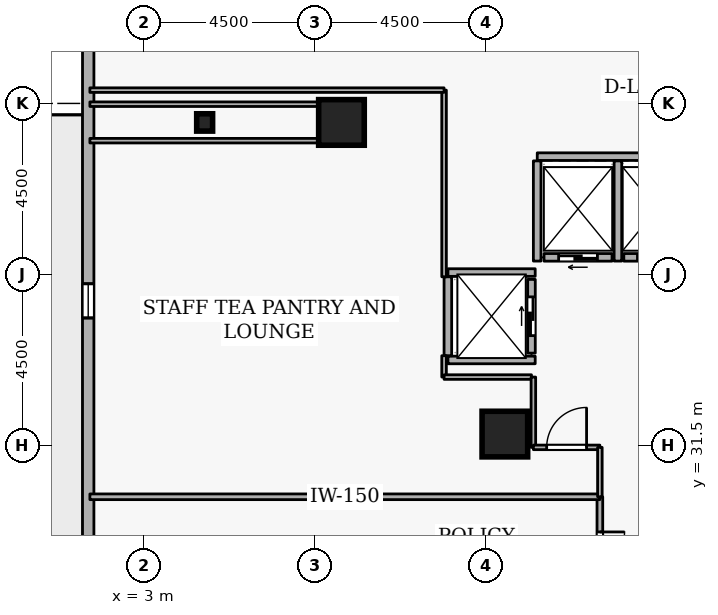
"""IFC4 building model, lengths in metres.
Left out: names, types, materials, properties, quantities, classifications, styles, units other than length and angle.
Written with IfcOpenShell. Run it as: python <this file> out.ifc"""

import sys

from ifc_helpers import new_model, si_unit, direction, frame, frame_2d, origin, origin_2d, place, context, subcontext, project, spatial, rectangle, i_section, extrude, element, fill, save


model = new_model("IFC4")
c1 = context("Model", 3, precision=1e-05, world=origin(), true_north=direction((0.0, 1.0)))
c2 = subcontext(c1, "Body", "Model", "MODEL_VIEW")
j1 = project(units=[si_unit("LENGTHUNIT", "METRE"), si_unit("PLANEANGLEUNIT", "RADIAN")], contexts=[c1])
p1 = place(None, origin())
s1 = spatial("IfcSite", under=j1, at=p1, CompositionType="ELEMENT")
p2 = place(p1, origin())
s2 = spatial("IfcBuilding", under=s1, at=p2, CompositionType="ELEMENT")
p3 = place(p2, frame((0.0, 0.0, 112.5)))
s3 = spatial("IfcBuildingStorey", under=s2, at=p3, CompositionType="ELEMENT", Elevation=112.5)
for number, where, z_axis, x_axis in (
    (1, (8.2, 40.0, 0.0), (0.0, 0.0, 1.0), (1.0, 0.0, 0.0)),
    (2, (12.5, 31.8, 0.0), (0.0, 0.0, 1.0), (1.0, 0.0, 0.0)),
):
    element("IfcColumn", number, at=place(p3, frame(where, z_axis=z_axis, x_axis=x_axis)), inside=s3, PredefinedType="COLUMN", context=c2, shape_type="SweptSolid", body=[
        extrude(rectangle(XDim=1.2, YDim=1.2, at=origin_2d()), origin(), (0.0, 0.0, 1.0), 3.6),
    ])
p4 = place(p3, frame((4.6, 40.0, 0.0), z_axis=(0.0, 0.0, 1.0), x_axis=(1.0, 0.0, 0.0)))
e3 = element("IfcColumn", 3, at=p4, inside=s3, PredefinedType="COLUMN", context=c2, shape_type="SweptSolid", body=[
    extrude(i_section(OverallWidth=0.418, OverallDepth=0.456, WebThickness=0.042, FlangeThickness=0.067, FilletRadius=0.015, at=origin_2d()), origin(), (0.0, 0.0, 1.0), 3.6),
])
p5 = place(p3, frame((1.536, 48.055, 0.0), z_axis=(0.0, 0.0, 1.0), x_axis=(-2.6801568e-05, -0.999999999641, 0.0)))
e4 = element("IfcWall", 4, at=p5, inside=s3, PredefinedType="STANDARD", context=c2, shape_type="SweptSolid", body=[
    extrude(rectangle(XDim=36.437, YDim=0.3, at=frame_2d((18.218, 0.0))), origin(), (0.0, 0.0, 1.0), 2.7),
])
p6 = place(p5, frame((19.118, 0.0, 0.0)))
e5 = element("IfcOpeningElement", 5, at=p6, cuts=e4, PredefinedType="OPENING", context=c2, shape_type="SweptSolid", body=[
    extrude(rectangle(XDim=1.0, YDim=2.08, at=frame_2d((0.5, 1.04))), frame((0.0, 0.16, 0.0), z_axis=(0.0, -1.0, 0.0), x_axis=(1.0, 0.0, 0.0)), (0.0, 0.0, 1.0), 0.32),
])
p7 = place(p5, frame((2.7, 0.0, 0.72)))
e6 = element("IfcOpeningElement", 6, at=p7, cuts=e4, PredefinedType="OPENING", context=c2, shape_type="SweptSolid", body=[
    extrude(rectangle(XDim=0.9, YDim=1.75, at=frame_2d((0.45, 0.875))), frame((0.0, 0.16, 0.0), z_axis=(0.0, -1.0, 0.0), x_axis=(1.0, 0.0, 0.0)), (0.0, 0.0, 1.0), 0.32),
])
p8 = place(p5, frame((12.3, 0.0, 0.72)))
e7 = element("IfcOpeningElement", 7, at=p8, cuts=e4, PredefinedType="OPENING", context=c2, shape_type="SweptSolid", body=[
    extrude(rectangle(XDim=0.9, YDim=1.75, at=frame_2d((0.45, 0.875))), frame((0.0, 0.16, 0.0), z_axis=(0.0, -1.0, 0.0), x_axis=(1.0, 0.0, 0.0)), (0.0, 0.0, 1.0), 0.32),
])
p9 = place(p5, frame((21.9, 0.0, 0.72)))
e8 = element("IfcOpeningElement", 8, at=p9, cuts=e4, PredefinedType="OPENING", context=c2, shape_type="SweptSolid", body=[
    extrude(rectangle(XDim=0.9, YDim=1.75, at=frame_2d((0.45, 0.875))), frame((0.0, 0.16, 0.0), z_axis=(0.0, -1.0, 0.0), x_axis=(1.0, 0.0, 0.0)), (0.0, 0.0, 1.0), 0.32),
])
p10 = place(p5, frame((26.7, 0.0, 0.72)))
e9 = element("IfcOpeningElement", 9, at=p10, cuts=e4, PredefinedType="OPENING", context=c2, shape_type="SweptSolid", body=[
    extrude(rectangle(XDim=0.9, YDim=1.75, at=frame_2d((0.45, 0.875))), frame((0.0, 0.16, 0.0), z_axis=(0.0, -1.0, 0.0), x_axis=(1.0, 0.0, 0.0)), (0.0, 0.0, 1.0), 0.32),
])
p11 = place(p5, frame((31.5, 0.0, 0.72)))
e10 = element("IfcOpeningElement", 10, at=p11, cuts=e4, PredefinedType="OPENING", context=c2, shape_type="SweptSolid", body=[
    extrude(rectangle(XDim=0.9, YDim=1.75, at=frame_2d((0.45, 0.875))), frame((0.0, 0.16, 0.0), z_axis=(0.0, -1.0, 0.0), x_axis=(1.0, 0.0, 0.0)), (0.0, 0.0, 1.0), 0.32),
])
p12 = place(p3, frame((17.37, 36.45, 0.0), z_axis=(0.0, 0.0, 1.0), x_axis=(-1.0, 0.0, 0.0)))
e11 = element("IfcWall", 11, at=p12, inside=s3, PredefinedType="STANDARD", context=c2, shape_type="SweptSolid", body=[
    extrude(rectangle(XDim=1.74, YDim=0.2, at=frame_2d((0.87, 0.0))), origin(), (0.0, 0.0, 1.0), 3.34),
])
p13 = place(p12, frame((0.36, 0.0, 0.0)))
e12 = element("IfcOpeningElement", 12, at=p13, cuts=e11, PredefinedType="OPENING", context=c2, shape_type="SweptSolid", body=[
    extrude(rectangle(XDim=1.02, YDim=2.06, at=frame_2d((0.51, 1.03))), frame((0.0, 0.11, 0.0), z_axis=(0.0, -1.0, 0.0), x_axis=(1.0, 0.0, 0.0)), (0.0, 0.0, 1.0), 0.22),
])
p14 = place(p3, frame((15.32, 36.45, 0.0), z_axis=(0.0, 0.0, 1.0), x_axis=(-1.0, 0.0, 0.0)))
e13 = element("IfcWall", 13, at=p14, inside=s3, PredefinedType="STANDARD", context=c2, shape_type="SweptSolid", body=[
    extrude(rectangle(XDim=1.79, YDim=0.2, at=frame_2d((0.895, 0.0))), origin(), (0.0, 0.0, 1.0), 3.34),
])
p15 = place(p14, frame((0.385, 0.0, 0.0)))
e14 = element("IfcOpeningElement", 14, at=p15, cuts=e13, PredefinedType="OPENING", context=c2, shape_type="SweptSolid", body=[
    extrude(rectangle(XDim=1.02, YDim=2.06, at=frame_2d((0.51, 1.03))), frame((0.0, 0.11, 0.0), z_axis=(0.0, -1.0, 0.0), x_axis=(1.0, 0.0, 0.0)), (0.0, 0.0, 1.0), 0.22),
])
p16 = place(p3, frame((13.2, 33.93, 0.0), z_axis=(0.0, 0.0, 1.0), x_axis=(0.0, 1.0, 0.0)))
e15 = element("IfcWall", 15, at=p16, inside=s3, PredefinedType="STANDARD", context=c2, shape_type="SweptSolid", body=[
    extrude(rectangle(XDim=1.94, YDim=0.2, at=frame_2d((0.97, 0.0))), origin(), (0.0, 0.0, 1.0), 3.34),
])
p17 = place(p16, frame((0.46, 0.0, 0.0)))
e16 = element("IfcOpeningElement", 16, at=p17, cuts=e15, PredefinedType="OPENING", context=c2, shape_type="SweptSolid", body=[
    extrude(rectangle(XDim=1.02, YDim=2.06, at=frame_2d((0.51, 1.03))), frame((0.0, 0.11, 0.0), z_axis=(0.0, -1.0, 0.0), x_axis=(1.0, 0.0, 0.0)), (0.0, 0.0, 1.0), 0.22),
])
p18 = place(p3, frame((13.352, 39.1, 0.0), z_axis=(0.0, 0.0, 1.0), x_axis=(1.0, 0.0, 0.0)))
e17 = element("IfcWall", 17, at=p18, inside=s3, PredefinedType="STANDARD", context=c2, shape_type="SweptSolid", body=[
    extrude(rectangle(XDim=4.196, YDim=0.2, at=frame_2d((2.098, 0.0))), origin(), (0.0, 0.0, 1.0), 3.34),
])
for number, where, z_axis, x_axis in (
    (18, (15.475, 36.352, 0.0), (0.0, 0.0, 1.0), (0.0, 1.0, 0.0)),
    (19, (13.35, 36.352, 0.0), (0.0, 0.0, 1.0), (0.0, 1.0, 0.0)),
):
    element("IfcWall", number, at=place(p3, frame(where, z_axis=z_axis, x_axis=x_axis)), inside=s3, PredefinedType="STANDARD", context=c2, shape_type="SweptSolid", body=[
        extrude(rectangle(XDim=2.636, YDim=0.2, at=frame_2d((1.318, 0.0))), origin(), (0.0, 0.0, 1.0), 3.34),
    ])
for number, where, z_axis, x_axis in (
    (20, (11.002, 36.05, 0.0), (0.0, 0.0, 1.0), (1.0, 0.0, 0.0)),
    (21, (11.002, 33.75, 0.0), (0.0, 0.0, 1.0), (1.0, 0.0, 0.0)),
):
    element("IfcWall", number, at=place(p3, frame(where, z_axis=z_axis, x_axis=x_axis)), inside=s3, PredefinedType="STANDARD", context=c2, shape_type="SweptSolid", body=[
        extrude(rectangle(XDim=2.296, YDim=0.2, at=frame_2d((1.148, 0.0))), origin(), (0.0, 0.0, 1.0), 3.34),
    ])
p19 = place(p3, frame((11.0, 33.862, 0.0), z_axis=(0.0, 0.0, 1.0), x_axis=(0.0, 1.0, 0.0)))
e22 = element("IfcWall", 22, at=p19, inside=s3, PredefinedType="STANDARD", context=c2, shape_type="SweptSolid", body=[
    extrude(rectangle(XDim=2.076, YDim=0.2, at=frame_2d((1.038, 0.0))), origin(), (0.0, 0.0, 1.0), 3.34),
])
p20 = place(p3, frame((15.0, 30.15, 0.0), z_axis=(0.0, 0.0, 1.0), x_axis=(0.0, -1.0, 0.0)))
e23 = element("IfcWall", 23, at=p20, inside=s3, PredefinedType="PARTITIONING", context=c2, shape_type="SweptSolid", body=[
    extrude(rectangle(XDim=3.15, YDim=0.15, at=frame_2d((1.575, 0.0))), origin(), (0.0, 0.0, 1.0), 3.34),
])
p21 = place(p20, frame((0.925, 0.0, 0.0)))
e24 = element("IfcOpeningElement", 24, at=p21, cuts=e23, PredefinedType="OPENING", context=c2, shape_type="SweptSolid", body=[
    extrude(rectangle(XDim=1.3, YDim=2.12, at=frame_2d((0.65, 1.06))), frame((0.0, 0.085, 0.0), z_axis=(0.0, -1.0, 0.0), x_axis=(1.0, 0.0, 0.0)), (0.0, 0.0, 1.0), 0.17),
])
p22 = place(p3, frame((1.58, 30.15, 0.0), z_axis=(0.0, 0.0, 1.0), x_axis=(1.0, 0.0, 0.0)))
e25 = element("IfcWall", 25, at=p22, inside=s3, PredefinedType="PARTITIONING", context=c2, shape_type="SweptSolid", body=[
    extrude(rectangle(XDim=13.42, YDim=0.15, at=frame_2d((6.71, 0.0))), origin(), (0.0, 0.0, 1.0), 3.34),
])
p23 = place(p3, frame((10.9, 40.85, 0.0), z_axis=(0.0, 0.0, 1.0), x_axis=(0.0, -1.0, 0.0)))
e26 = element("IfcWall", 26, at=p23, inside=s3, PredefinedType="PARTITIONING", context=c2, shape_type="SweptSolid", body=[
    extrude(rectangle(XDim=4.912, YDim=0.12, at=frame_2d((2.456, 0.0))), origin(), (0.0, 0.0, 1.0), 3.34),
])
p24 = place(p3, frame((10.9, 33.862, 0.0), z_axis=(0.0, 0.0, 1.0), x_axis=(0.0, -1.0, 0.0)))
e27 = element("IfcWall", 27, at=p24, inside=s3, PredefinedType="PARTITIONING", context=c2, shape_type="SweptSolid", body=[
    extrude(rectangle(XDim=0.562, YDim=0.12, at=frame_2d((0.281, 0.0))), origin(), (0.0, 0.0, 1.0), 3.34),
])
p25 = place(p3, frame((10.9, 33.3, 0.0), z_axis=(0.0, 0.0, 1.0), x_axis=(1.0, 0.0, 0.0)))
e28 = element("IfcWall", 28, at=p25, inside=s3, PredefinedType="PARTITIONING", context=c2, shape_type="SweptSolid", body=[
    extrude(rectangle(XDim=2.3, YDim=0.12, at=frame_2d((1.15, 0.0))), origin(), (0.0, 0.0, 1.0), 3.34),
])
p26 = place(p3, frame((13.25, 33.3, 0.0), z_axis=(0.0, 0.0, 1.0), x_axis=(0.0, -1.0, 0.0)))
e29 = element("IfcWall", 29, at=p26, inside=s3, PredefinedType="PARTITIONING", context=c2, shape_type="SweptSolid", body=[
    extrude(rectangle(XDim=1.85, YDim=0.12, at=frame_2d((0.925, 0.0))), origin(), (0.0, 0.0, 1.0), 3.34),
])
p27 = place(p3, frame((13.25, 31.45, 0.0), z_axis=(0.0, 0.0, 1.0), x_axis=(1.0, 0.0, 0.0)))
e30 = element("IfcWall", 30, at=p27, inside=s3, PredefinedType="PARTITIONING", context=c2, shape_type="SweptSolid", body=[
    extrude(rectangle(XDim=1.75, YDim=0.12, at=frame_2d((0.875, 0.0))), origin(), (0.0, 0.0, 1.0), 3.34),
])
p28 = place(p27, frame((0.35, 0.0, 0.0)))
e31 = element("IfcOpeningElement", 31, at=p28, cuts=e30, PredefinedType="OPENING", context=c2, shape_type="SweptSolid", body=[
    extrude(rectangle(XDim=1.05, YDim=2.1, at=frame_2d((0.525, 1.05))), frame((0.0, 0.07, 0.0), z_axis=(0.0, -1.0, 0.0), x_axis=(1.0, 0.0, 0.0)), (0.0, 0.0, 1.0), 0.14),
])
p29 = place(p3, frame((15.0, 31.45, 0.0), z_axis=(0.0, 0.0, 1.0), x_axis=(0.0, -1.0, 0.0)))
e32 = element("IfcWall", 32, at=p29, inside=s3, PredefinedType="PARTITIONING", context=c2, shape_type="SweptSolid", body=[
    extrude(rectangle(XDim=1.3, YDim=0.12, at=frame_2d((0.65, 0.0))), origin(), (0.0, 0.0, 1.0), 3.34),
])
for number, where, z_axis, x_axis in (
    (33, (1.58, 39.52, 0.0), (0.0, 0.0, 1.0), (1.0, 0.0, 0.0)),
    (34, (8.2, 40.48, 0.0), (0.0, 0.0, 1.0), (-1.0, 0.0, 0.0)),
):
    element("IfcWall", number, at=place(p3, frame(where, z_axis=z_axis, x_axis=x_axis)), inside=s3, PredefinedType="PARTITIONING", context=c2, shape_type="SweptSolid", body=[
        extrude(rectangle(XDim=6.62, YDim=0.12, at=frame_2d((3.31, 0.0))), origin(), (0.0, 0.0, 1.0), 3.34),
    ])
p30 = place(p3, frame((1.58, 40.85, 0.0), z_axis=(0.0, 0.0, 1.0), x_axis=(1.0, 0.0, 0.0)))
e35 = element("IfcWall", 35, at=p30, inside=s3, PredefinedType="PARTITIONING", context=c2, shape_type="SweptSolid", body=[
    extrude(rectangle(XDim=9.32, YDim=0.12, at=frame_2d((4.66, 0.0))), origin(), (0.0, 0.0, 1.0), 3.34),
])
p31 = place(p8, origin())
e36 = element("IfcWindow", 36, at=p31, inside=s3, PartitioningType="SINGLE_PANEL", PredefinedType="WINDOW", context=c2, shape_type="SweptSolid", body=[
    extrude(rectangle(XDim=0.9, YDim=1.75, at=frame_2d((0.45, 0.875))), frame((0.0, 0.03, 0.0), z_axis=(0.0, -1.0, 0.0), x_axis=(1.0, 0.0, 0.0)), (0.0, 0.0, 1.0), 0.06),
])
fill(e7, e36)
p32 = place(p13, origin())
e37 = element("IfcDoor", 37, at=p32, inside=s3, OperationType="SLIDING_TO_LEFT", PredefinedType="DOOR", context=c2, shape_type="SweptSolid", body=[
    extrude(rectangle(XDim=1.02, YDim=2.06, at=frame_2d((0.51, 1.03))), frame((0.0, 0.025, 0.0), z_axis=(0.0, -1.0, 0.0), x_axis=(1.0, 0.0, 0.0)), (0.0, 0.0, 1.0), 0.05),
])
fill(e12, e37)
p33 = place(p15, origin())
e38 = element("IfcDoor", 38, at=p33, inside=s3, OperationType="SLIDING_TO_LEFT", PredefinedType="DOOR", context=c2, shape_type="SweptSolid", body=[
    extrude(rectangle(XDim=1.02, YDim=2.06, at=frame_2d((0.51, 1.03))), frame((0.0, 0.025, 0.0), z_axis=(0.0, -1.0, 0.0), x_axis=(1.0, 0.0, 0.0)), (0.0, 0.0, 1.0), 0.05),
])
fill(e14, e38)
p34 = place(p17, origin())
e39 = element("IfcDoor", 39, at=p34, inside=s3, OperationType="SLIDING_TO_LEFT", PredefinedType="DOOR", context=c2, shape_type="SweptSolid", body=[
    extrude(rectangle(XDim=1.02, YDim=2.06, at=frame_2d((0.51, 1.03))), frame((0.0, 0.025, 0.0), z_axis=(0.0, -1.0, 0.0), x_axis=(1.0, 0.0, 0.0)), (0.0, 0.0, 1.0), 0.05),
])
fill(e16, e39)
p35 = place(p21, origin())
e40 = element("IfcDoor", 40, at=p35, inside=s3, OperationType="DOUBLE_DOOR_SINGLE_SWING", PredefinedType="DOOR", context=c2, shape_type="SweptSolid", body=[
    extrude(rectangle(XDim=1.3, YDim=2.12, at=frame_2d((0.65, 1.06))), frame((0.0, 0.025, 0.0), z_axis=(0.0, -1.0, 0.0), x_axis=(1.0, 0.0, 0.0)), (0.0, 0.0, 1.0), 0.05),
])
fill(e24, e40)
p36 = place(p28, origin())
e41 = element("IfcDoor", 41, at=p36, inside=s3, OperationType="SINGLE_SWING_RIGHT", PredefinedType="DOOR", context=c2, shape_type="SweptSolid", body=[
    extrude(rectangle(XDim=1.05, YDim=2.1, at=frame_2d((0.525, 1.05))), frame((0.0, 0.025, 0.0), z_axis=(0.0, -1.0, 0.0), x_axis=(1.0, 0.0, 0.0)), (0.0, 0.0, 1.0), 0.05),
])
fill(e31, e41)
save(model, sys.argv[1])
